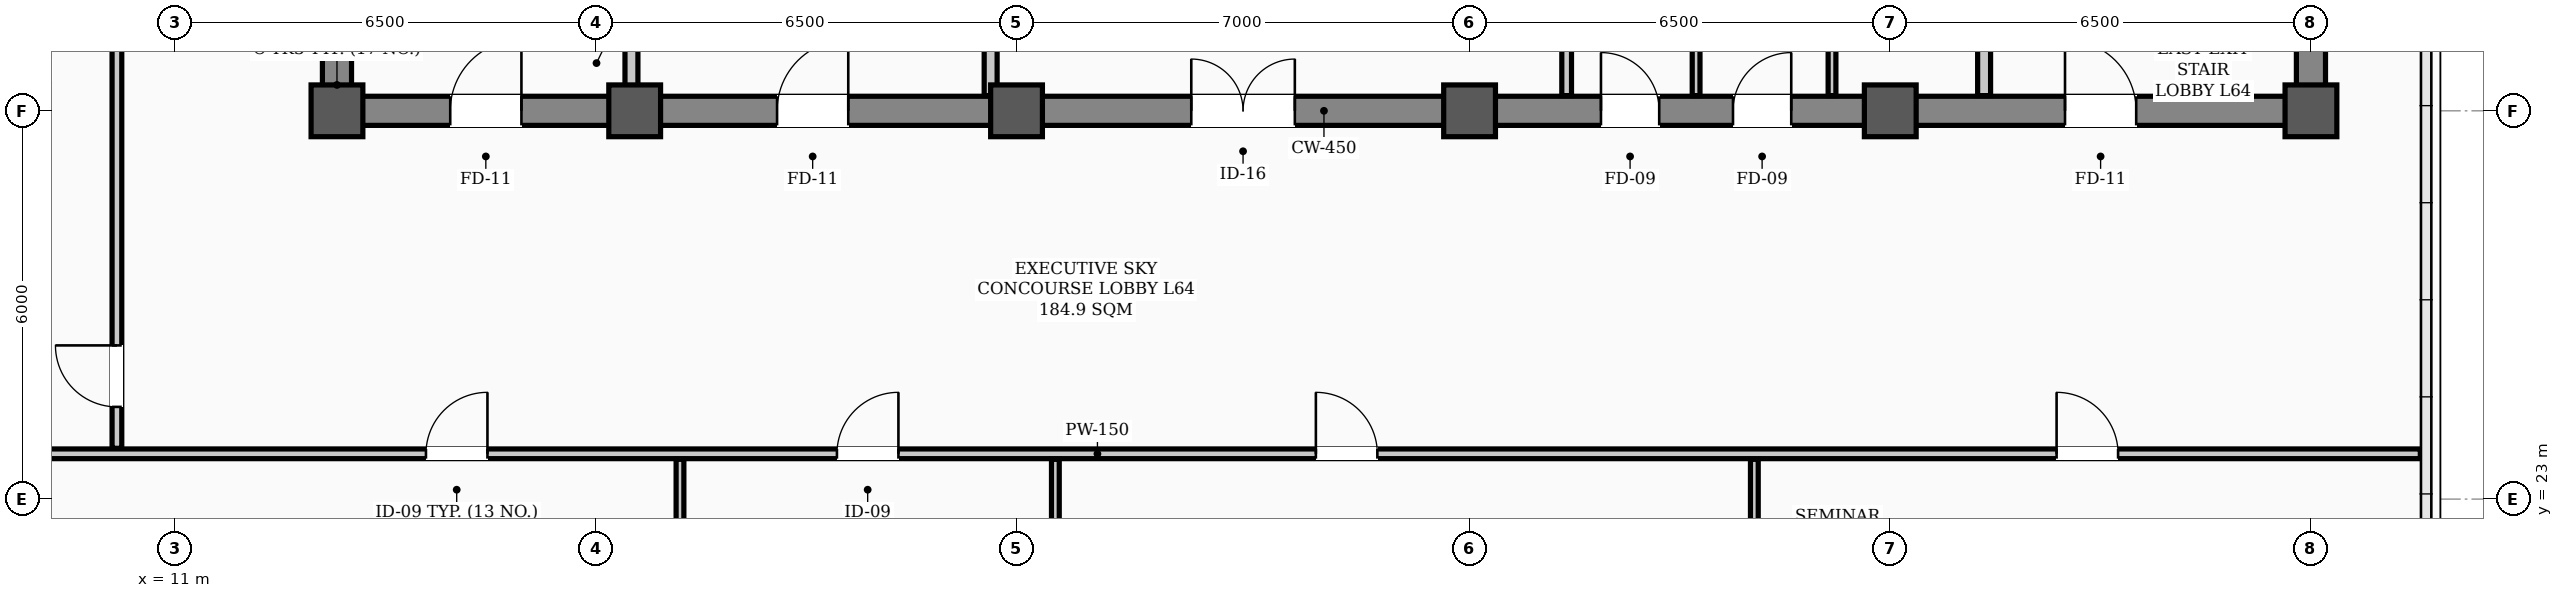
"""IFC4 building model, lengths in metres.
Left out: names, types, materials, properties, quantities, classifications, styles, units other than length and angle.
Written with IfcOpenShell. Run it as: python <this file> out.ifc"""

import sys

from ifc_helpers import new_model, si_unit, direction, frame, frame_2d, origin, origin_2d, place, context, subcontext, project, spatial, rectangle, hollow_rectangle, extrude, element, fill, save


model = new_model("IFC4")
c1 = context("Model", 3, precision=1e-05, world=origin(), true_north=direction((0.0, 1.0)))
c2 = subcontext(c1, "Body", "Model", "MODEL_VIEW")
j1 = project(units=[si_unit("LENGTHUNIT", "METRE"), si_unit("PLANEANGLEUNIT", "RADIAN")], contexts=[c1])
p1 = place(None, origin())
s1 = spatial("IfcSite", under=j1, at=p1, CompositionType="ELEMENT")
p2 = place(p1, origin())
s2 = spatial("IfcBuilding", under=s1, at=p2, CompositionType="ELEMENT")
p3 = place(p2, frame((0.0, 0.0, 257.9)))
s3 = spatial("IfcBuildingStorey", under=s2, at=p3, CompositionType="ELEMENT", Elevation=257.9)
for number, where, z_axis, x_axis in (
    (1, (13.5, 29.0, 0.0), (0.0, 0.0, 1.0), (1.0, 0.0, 0.0)),
    (2, (18.1, 29.0, 0.0), (0.0, 0.0, 1.0), (1.0, 0.0, 0.0)),
    (3, (24.0, 29.0, 0.0), (0.0, 0.0, 1.0), (1.0, 0.0, 0.0)),
    (4, (31.0, 29.0, 0.0), (0.0, 0.0, 1.0), (1.0, 0.0, 0.0)),
    (5, (37.5, 29.0, 0.0), (0.0, 0.0, 1.0), (1.0, 0.0, 0.0)),
    (6, (44.0, 29.0, 0.0), (0.0, 0.0, 1.0), (1.0, 0.0, 0.0)),
):
    element("IfcColumn", number, at=place(p3, frame(where, z_axis=z_axis, x_axis=x_axis)), inside=s3, PredefinedType="COLUMN", context=c2, shape_type="SweptSolid", body=[
        extrude(hollow_rectangle(XDim=0.8, YDim=0.8, WallThickness=0.032, InnerFilletRadius=0.016, OuterFilletRadius=0.048, at=origin_2d()), origin(), (0.0, 0.0, 1.0), 3.9),
    ])
p4 = place(p3, frame((13.5, 29.0, 0.0), z_axis=(0.0, 0.0, 1.0), x_axis=(1.0, 0.0, 0.0)))
e7 = element("IfcWall", 7, at=p4, inside=s3, PredefinedType="SHEAR", context=c2, shape_type="SweptSolid", body=[
    extrude(rectangle(XDim=30.5, YDim=0.45, at=frame_2d((15.25, 0.0))), origin(), (0.0, 0.0, 1.0), 3.72),
])
p5 = place(p4, frame((1.75, 0.0, 0.0)))
e8 = element("IfcOpeningElement", 8, at=p5, cuts=e7, PredefinedType="OPENING", context=c2, shape_type="SweptSolid", body=[
    extrude(rectangle(XDim=1.1, YDim=2.08, at=frame_2d((0.55, 1.04))), frame((0.0, 0.235, 0.0), z_axis=(0.0, -1.0, 0.0), x_axis=(1.0, 0.0, 0.0)), (0.0, 0.0, 1.0), 0.47),
])
p6 = place(p4, frame((26.7, 0.0, 0.0)))
e9 = element("IfcOpeningElement", 9, at=p6, cuts=e7, PredefinedType="OPENING", context=c2, shape_type="SweptSolid", body=[
    extrude(rectangle(XDim=1.1, YDim=2.08, at=frame_2d((0.55, 1.04))), frame((0.0, 0.235, 0.0), z_axis=(0.0, -1.0, 0.0), x_axis=(1.0, 0.0, 0.0)), (0.0, 0.0, 1.0), 0.47),
])
p7 = place(p4, frame((6.8, 0.0, 0.0)))
e10 = element("IfcOpeningElement", 10, at=p7, cuts=e7, PredefinedType="OPENING", context=c2, shape_type="SweptSolid", body=[
    extrude(rectangle(XDim=1.1, YDim=2.08, at=frame_2d((0.55, 1.04))), frame((0.0, 0.235, 0.0), z_axis=(0.0, -1.0, 0.0), x_axis=(1.0, 0.0, 0.0)), (0.0, 0.0, 1.0), 0.47),
])
p8 = place(p4, frame((13.2, 0.0, 0.0)))
e11 = element("IfcOpeningElement", 11, at=p8, cuts=e7, PredefinedType="OPENING", context=c2, shape_type="SweptSolid", body=[
    extrude(rectangle(XDim=1.6, YDim=2.08, at=frame_2d((0.8, 1.04))), frame((0.0, 0.235, 0.0), z_axis=(0.0, -1.0, 0.0), x_axis=(1.0, 0.0, 0.0)), (0.0, 0.0, 1.0), 0.47),
])
p9 = place(p4, frame((19.53, 0.0, 0.0)))
e12 = element("IfcOpeningElement", 12, at=p9, cuts=e7, PredefinedType="OPENING", context=c2, shape_type="SweptSolid", body=[
    extrude(rectangle(XDim=0.9, YDim=2.08, at=frame_2d((0.45, 1.04))), frame((0.0, 0.235, 0.0), z_axis=(0.0, -1.0, 0.0), x_axis=(1.0, 0.0, 0.0)), (0.0, 0.0, 1.0), 0.47),
])
p10 = place(p4, frame((21.57, 0.0, 0.0)))
e13 = element("IfcOpeningElement", 13, at=p10, cuts=e7, PredefinedType="OPENING", context=c2, shape_type="SweptSolid", body=[
    extrude(rectangle(XDim=0.9, YDim=2.08, at=frame_2d((0.45, 1.04))), frame((0.0, 0.235, 0.0), z_axis=(0.0, -1.0, 0.0), x_axis=(1.0, 0.0, 0.0)), (0.0, 0.0, 1.0), 0.47),
])
for number, where, z_axis, x_axis in (
    (14, (13.5, 29.35, 0.0), (0.0, 0.0, 1.0), (0.0, 1.0, 0.0)),
    (15, (44.0, 29.35, 0.0), (0.0, 0.0, 1.0), (0.0, 1.0, 0.0)),
):
    element("IfcWall", number, at=place(p3, frame(where, z_axis=z_axis, x_axis=x_axis)), inside=s3, PredefinedType="SHEAR", context=c2, shape_type="SweptSolid", body=[
        extrude(rectangle(XDim=8.6, YDim=0.45, at=frame_2d((4.3, 0.0))), origin(), (0.0, 0.0, 1.0), 3.72),
    ])
p11 = place(p3, frame((4.81, 23.7, 0.0), z_axis=(0.0, 0.0, 1.0), x_axis=(1.0, 0.0, 0.0)))
e16 = element("IfcWall", 16, at=p11, inside=s3, PredefinedType="PARTITIONING", context=c2, shape_type="SweptSolid", body=[
    extrude(rectangle(XDim=40.88, YDim=0.15, at=frame_2d((20.44, 0.0))), origin(), (0.0, 0.0, 1.0), 3.2),
])
p12 = place(p11, frame((10.065, 0.0, 0.0)))
e17 = element("IfcOpeningElement", 17, at=p12, cuts=e16, PredefinedType="OPENING", context=c2, shape_type="SweptSolid", body=[
    extrude(rectangle(XDim=0.95, YDim=2.08, at=frame_2d((0.475, 1.04))), frame((0.0, 0.085, 0.0), z_axis=(0.0, -1.0, 0.0), x_axis=(1.0, 0.0, 0.0)), (0.0, 0.0, 1.0), 0.17),
])
p13 = place(p11, frame((16.415, 0.0, 0.0)))
e18 = element("IfcOpeningElement", 18, at=p13, cuts=e16, PredefinedType="OPENING", context=c2, shape_type="SweptSolid", body=[
    extrude(rectangle(XDim=0.95, YDim=2.08, at=frame_2d((0.475, 1.04))), frame((0.0, 0.085, 0.0), z_axis=(0.0, -1.0, 0.0), x_axis=(1.0, 0.0, 0.0)), (0.0, 0.0, 1.0), 0.17),
])
p14 = place(p11, frame((23.815, 0.0, 0.0)))
e19 = element("IfcOpeningElement", 19, at=p14, cuts=e16, PredefinedType="OPENING", context=c2, shape_type="SweptSolid", body=[
    extrude(rectangle(XDim=0.95, YDim=2.08, at=frame_2d((0.475, 1.04))), frame((0.0, 0.085, 0.0), z_axis=(0.0, -1.0, 0.0), x_axis=(1.0, 0.0, 0.0)), (0.0, 0.0, 1.0), 0.17),
])
p15 = place(p11, frame((35.26, 0.0, 0.0)))
e20 = element("IfcOpeningElement", 20, at=p15, cuts=e16, PredefinedType="OPENING", context=c2, shape_type="SweptSolid", body=[
    extrude(rectangle(XDim=0.95, YDim=2.08, at=frame_2d((0.475, 1.04))), frame((0.0, 0.085, 0.0), z_axis=(0.0, -1.0, 0.0), x_axis=(1.0, 0.0, 0.0)), (0.0, 0.0, 1.0), 0.17),
])
p16 = place(p3, frame((18.05, 29.235, 0.0), z_axis=(0.0, 0.0, 1.0), x_axis=(0.0, 1.0, 0.0)))
e21 = element("IfcWall", 21, at=p16, inside=s3, PredefinedType="STANDARD", context=c2, shape_type="SweptSolid", body=[
    extrude(rectangle(XDim=1.065, YDim=0.2, at=frame_2d((0.532, 0.0))), origin(), (0.0, 0.0, 1.0), 3.4),
])
p17 = place(p3, frame((38.95, 29.235, 0.0), z_axis=(0.0, 0.0, 1.0), x_axis=(0.0, 1.0, 0.0)))
e22 = element("IfcWall", 22, at=p17, inside=s3, PredefinedType="STANDARD", context=c2, shape_type="SweptSolid", body=[
    extrude(rectangle(XDim=1.065, YDim=0.2, at=frame_2d((0.532, 0.0))), origin(), (0.0, 0.0, 1.0), 3.72),
])
p18 = place(p3, frame((23.6, 29.235, 0.0), z_axis=(0.0, 0.0, 1.0), x_axis=(0.0, 1.0, 0.0)))
e23 = element("IfcWall", 23, at=p18, inside=s3, PredefinedType="STANDARD", context=c2, shape_type="SweptSolid", body=[
    extrude(rectangle(XDim=5.465, YDim=0.2, at=frame_2d((2.732, 0.0))), origin(), (0.0, 0.0, 1.0), 3.2),
])
p19 = place(p3, frame((32.5, 29.235, 0.0), z_axis=(0.0, 0.0, 1.0), x_axis=(0.0, 1.0, 0.0)))
e24 = element("IfcWall", 24, at=p19, inside=s3, PredefinedType="PARTITIONING", context=c2, shape_type="SweptSolid", body=[
    extrude(rectangle(XDim=2.53, YDim=0.15, at=frame_2d((1.265, 0.0))), origin(), (0.0, 0.0, 1.0), 3.4),
])
for number, where, z_axis, x_axis in (
    (25, (36.6, 29.235, 0.0), (0.0, 0.0, 1.0), (0.0, 1.0, 0.0)),
    (26, (34.5, 29.235, 0.0), (0.0, 0.0, 1.0), (0.0, 1.0, 0.0)),
):
    element("IfcWall", number, at=place(p3, frame(where, z_axis=z_axis, x_axis=x_axis)), inside=s3, PredefinedType="PARTITIONING", context=c2, shape_type="SweptSolid", body=[
        extrude(rectangle(XDim=2.53, YDim=0.12, at=frame_2d((1.265, 0.0))), origin(), (0.0, 0.0, 1.0), 3.4),
    ])
p20 = place(p3, frame((10.1, 23.785, 0.0), z_axis=(0.0, 0.0, 1.0), x_axis=(0.0, 1.0, 0.0)))
e27 = element("IfcWall", 27, at=p20, inside=s3, PredefinedType="PARTITIONING", context=c2, shape_type="SweptSolid", body=[
    extrude(rectangle(XDim=17.88, YDim=0.15, at=frame_2d((8.94, 0.0))), origin(), (0.0, 0.0, 1.0), 3.1),
])
p21 = place(p20, frame((0.64, 0.0, 0.0)))
e28 = element("IfcOpeningElement", 28, at=p21, cuts=e27, PredefinedType="OPENING", context=c2, shape_type="SweptSolid", body=[
    extrude(rectangle(XDim=0.95, YDim=2.08, at=frame_2d((0.475, 1.04))), frame((0.0, 0.085, 0.0), z_axis=(0.0, -1.0, 0.0), x_axis=(1.0, 0.0, 0.0)), (0.0, 0.0, 1.0), 0.17),
])
p22 = place(p20, frame((13.015, 0.0, 0.0)))
e29 = element("IfcOpeningElement", 29, at=p22, cuts=e27, PredefinedType="OPENING", context=c2, shape_type="SweptSolid", body=[
    extrude(rectangle(XDim=0.95, YDim=2.08, at=frame_2d((0.475, 1.04))), frame((0.0, 0.085, 0.0), z_axis=(0.0, -1.0, 0.0), x_axis=(1.0, 0.0, 0.0)), (0.0, 0.0, 1.0), 0.17),
])
p23 = place(p3, frame((18.8, 17.91, 0.0), z_axis=(0.0, 0.0, 1.0), x_axis=(0.0, 1.0, 0.0)))
e30 = element("IfcWall", 30, at=p23, inside=s3, PredefinedType="PARTITIONING", context=c2, shape_type="SweptSolid", body=[
    extrude(rectangle(XDim=5.705, YDim=0.12, at=frame_2d((2.853, 0.0))), origin(), (0.0, 0.0, 1.0), 3.1),
])
p24 = place(p3, frame((24.6, 19.67, 0.0), z_axis=(0.0, 0.0, 1.0), x_axis=(0.0, 1.0, 0.0)))
e31 = element("IfcWall", 31, at=p24, inside=s3, PredefinedType="PARTITIONING", context=c2, shape_type="SweptSolid", body=[
    extrude(rectangle(XDim=3.945, YDim=0.12, at=frame_2d((1.973, 0.0))), origin(), (0.0, 0.0, 1.0), 3.1),
])
p25 = place(p3, frame((35.4, 17.91, 0.0), z_axis=(0.0, 0.0, 1.0), x_axis=(0.0, 1.0, 0.0)))
e32 = element("IfcWall", 32, at=p25, inside=s3, PredefinedType="PARTITIONING", context=c2, shape_type="SweptSolid", body=[
    extrude(rectangle(XDim=5.705, YDim=0.12, at=frame_2d((2.853, 0.0))), origin(), (0.0, 0.0, 1.0), 3.1),
])
p26 = place(p5, origin())
e33 = element("IfcDoor", 33, at=p26, inside=s3, OperationType="SINGLE_SWING_RIGHT", PredefinedType="DOOR", context=c2, shape_type="SweptSolid", body=[
    extrude(rectangle(XDim=1.1, YDim=2.08, at=frame_2d((0.55, 1.04))), frame((0.0, 0.025, 0.0), z_axis=(0.0, -1.0, 0.0), x_axis=(1.0, 0.0, 0.0)), (0.0, 0.0, 1.0), 0.05),
])
fill(e8, e33)
p27 = place(p6, origin())
e34 = element("IfcDoor", 34, at=p27, inside=s3, OperationType="SINGLE_SWING_LEFT", PredefinedType="DOOR", context=c2, shape_type="SweptSolid", body=[
    extrude(rectangle(XDim=1.1, YDim=2.08, at=frame_2d((0.55, 1.04))), frame((0.0, 0.025, 0.0), z_axis=(0.0, -1.0, 0.0), x_axis=(1.0, 0.0, 0.0)), (0.0, 0.0, 1.0), 0.05),
])
fill(e9, e34)
p28 = place(p7, origin())
e35 = element("IfcDoor", 35, at=p28, inside=s3, OperationType="SINGLE_SWING_RIGHT", PredefinedType="DOOR", context=c2, shape_type="SweptSolid", body=[
    extrude(rectangle(XDim=1.1, YDim=2.08, at=frame_2d((0.55, 1.04))), frame((0.0, 0.025, 0.0), z_axis=(0.0, -1.0, 0.0), x_axis=(1.0, 0.0, 0.0)), (0.0, 0.0, 1.0), 0.05),
])
fill(e10, e35)
p29 = place(p8, origin())
e36 = element("IfcDoor", 36, at=p29, inside=s3, OperationType="DOUBLE_DOOR_SINGLE_SWING", PredefinedType="DOOR", context=c2, shape_type="SweptSolid", body=[
    extrude(rectangle(XDim=1.6, YDim=2.08, at=frame_2d((0.8, 1.04))), frame((0.0, 0.025, 0.0), z_axis=(0.0, -1.0, 0.0), x_axis=(1.0, 0.0, 0.0)), (0.0, 0.0, 1.0), 0.05),
])
fill(e11, e36)
p30 = place(p9, origin())
e37 = element("IfcDoor", 37, at=p30, inside=s3, OperationType="SINGLE_SWING_LEFT", PredefinedType="DOOR", context=c2, shape_type="SweptSolid", body=[
    extrude(rectangle(XDim=0.9, YDim=2.08, at=frame_2d((0.45, 1.04))), frame((0.0, 0.025, 0.0), z_axis=(0.0, -1.0, 0.0), x_axis=(1.0, 0.0, 0.0)), (0.0, 0.0, 1.0), 0.05),
])
fill(e12, e37)
p31 = place(p10, origin())
e38 = element("IfcDoor", 38, at=p31, inside=s3, OperationType="SINGLE_SWING_RIGHT", PredefinedType="DOOR", context=c2, shape_type="SweptSolid", body=[
    extrude(rectangle(XDim=0.9, YDim=2.08, at=frame_2d((0.45, 1.04))), frame((0.0, 0.025, 0.0), z_axis=(0.0, -1.0, 0.0), x_axis=(1.0, 0.0, 0.0)), (0.0, 0.0, 1.0), 0.05),
])
fill(e13, e38)
p32 = place(p12, origin())
e39 = element("IfcDoor", 39, at=p32, inside=s3, OperationType="SINGLE_SWING_RIGHT", PredefinedType="DOOR", context=c2, shape_type="SweptSolid", body=[
    extrude(rectangle(XDim=0.95, YDim=2.08, at=frame_2d((0.475, 1.04))), frame((0.0, 0.025, 0.0), z_axis=(0.0, -1.0, 0.0), x_axis=(1.0, 0.0, 0.0)), (0.0, 0.0, 1.0), 0.05),
])
fill(e17, e39)
p33 = place(p13, origin())
e40 = element("IfcDoor", 40, at=p33, inside=s3, OperationType="SINGLE_SWING_RIGHT", PredefinedType="DOOR", context=c2, shape_type="SweptSolid", body=[
    extrude(rectangle(XDim=0.95, YDim=2.08, at=frame_2d((0.475, 1.04))), frame((0.0, 0.025, 0.0), z_axis=(0.0, -1.0, 0.0), x_axis=(1.0, 0.0, 0.0)), (0.0, 0.0, 1.0), 0.05),
])
fill(e18, e40)
p34 = place(p14, origin())
e41 = element("IfcDoor", 41, at=p34, inside=s3, OperationType="SINGLE_SWING_LEFT", PredefinedType="DOOR", context=c2, shape_type="SweptSolid", body=[
    extrude(rectangle(XDim=0.95, YDim=2.08, at=frame_2d((0.475, 1.04))), frame((0.0, 0.025, 0.0), z_axis=(0.0, -1.0, 0.0), x_axis=(1.0, 0.0, 0.0)), (0.0, 0.0, 1.0), 0.05),
])
fill(e19, e41)
p35 = place(p15, origin())
e42 = element("IfcDoor", 42, at=p35, inside=s3, OperationType="SINGLE_SWING_LEFT", PredefinedType="DOOR", context=c2, shape_type="SweptSolid", body=[
    extrude(rectangle(XDim=0.95, YDim=2.08, at=frame_2d((0.475, 1.04))), frame((0.0, 0.025, 0.0), z_axis=(0.0, -1.0, 0.0), x_axis=(1.0, 0.0, 0.0)), (0.0, 0.0, 1.0), 0.05),
])
fill(e20, e42)
p36 = place(p21, origin())
e43 = element("IfcDoor", 43, at=p36, inside=s3, OperationType="SINGLE_SWING_RIGHT", PredefinedType="DOOR", context=c2, shape_type="SweptSolid", body=[
    extrude(rectangle(XDim=0.95, YDim=2.08, at=frame_2d((0.475, 1.04))), frame((0.0, 0.025, 0.0), z_axis=(0.0, -1.0, 0.0), x_axis=(1.0, 0.0, 0.0)), (0.0, 0.0, 1.0), 0.05),
])
fill(e28, e43)
save(model, sys.argv[1])
